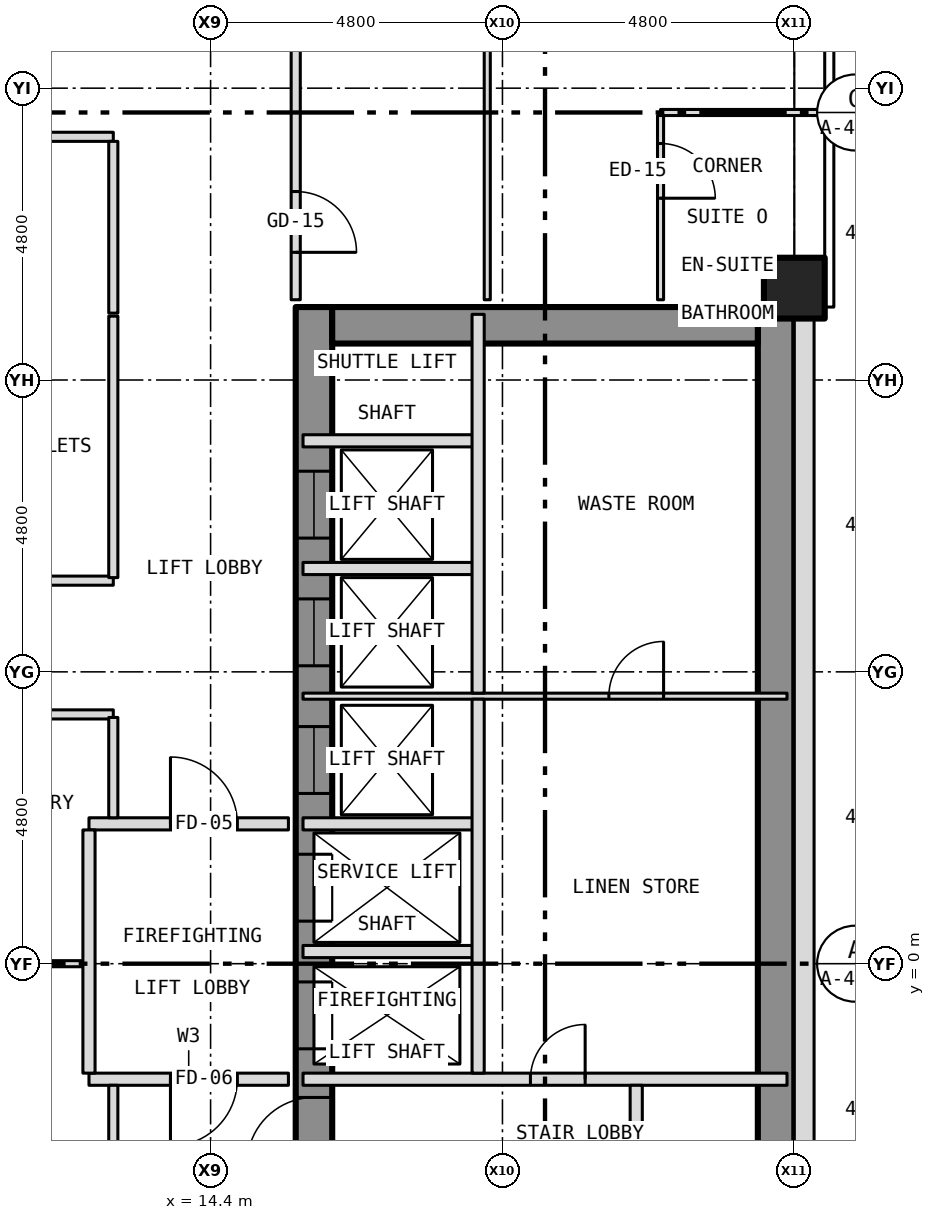
"""IFC4 building model, lengths in metres.
Left out: names, types, materials, properties, quantities, classifications, styles, units other than length and angle.
Written with IfcOpenShell. Run it as: python <this file> out.ifc"""

import sys

from ifc_helpers import new_model, si_unit, direction, frame, frame_2d, origin, origin_2d, place, context, subcontext, project, spatial, rectangle, hollow_rectangle, extrude, element, fill, save


model = new_model("IFC4")
c1 = context("Model", 3, precision=1e-05, world=origin(), true_north=direction((0.0, 1.0)))
c2 = subcontext(c1, "Body", "Model", "MODEL_VIEW")
j1 = project(units=[si_unit("LENGTHUNIT", "METRE"), si_unit("PLANEANGLEUNIT", "RADIAN")], contexts=[c1])
p1 = place(None, origin())
s1 = spatial("IfcSite", under=j1, at=p1, CompositionType="ELEMENT")
p2 = place(p1, origin())
s2 = spatial("IfcBuilding", under=s1, at=p2, CompositionType="ELEMENT")
p3 = place(p2, frame((0.0, 0.0, 53.0)))
s3 = spatial("IfcBuildingStorey", under=s2, at=p3, CompositionType="ELEMENT", Elevation=53.0)
p4 = place(p3, frame((24.0, 11.111, -0.15), z_axis=(0.0, 0.0, 1.0), x_axis=(1.0, 0.0, 0.0)))
e1 = element("IfcColumn", 1, at=p4, inside=s3, PredefinedType="COLUMN", context=c2, shape_type="SweptSolid", body=[
    extrude(hollow_rectangle(XDim=1.0, YDim=1.0, WallThickness=0.06, at=origin_2d()), origin(), (0.0, 0.0, 1.0), 3.5),
])
p5 = place(p3, frame((16.1, -10.8, 0.0), z_axis=(0.0, 0.0, 1.0), x_axis=(0.0, 1.0, 0.0)))
e2 = element("IfcWall", 2, at=p5, inside=s3, PredefinedType="SHEAR", context=c2, shape_type="SweptSolid", body=[
    extrude(rectangle(XDim=21.6, YDim=0.6, at=frame_2d((10.8, 0.0))), origin(), (0.0, 0.0, 1.0), 3.25),
])
p6 = place(p5, frame((9.4, 0.0, 0.0)))
e3 = element("IfcOpeningElement", 3, at=p6, cuts=e2, PredefinedType="OPENING", context=c2, shape_type="SweptSolid", body=[
    extrude(rectangle(XDim=1.1, YDim=2.1, at=frame_2d((0.55, 1.05))), frame((0.0, 0.312, 0.0), z_axis=(0.0, -1.0, 0.0), x_axis=(1.0, 0.0, 0.0)), (0.0, 0.0, 1.0), 0.624),
])
p7 = place(p5, frame((11.5, 0.0, 0.0)))
e4 = element("IfcOpeningElement", 4, at=p7, cuts=e2, PredefinedType="OPENING", context=c2, shape_type="SweptSolid", body=[
    extrude(rectangle(XDim=1.1, YDim=2.1, at=frame_2d((0.55, 1.05))), frame((0.0, 0.312, 0.0), z_axis=(0.0, -1.0, 0.0), x_axis=(1.0, 0.0, 0.0)), (0.0, 0.0, 1.0), 0.624),
])
p8 = place(p5, frame((13.6, 0.0, 0.0)))
e5 = element("IfcOpeningElement", 5, at=p8, cuts=e2, PredefinedType="OPENING", context=c2, shape_type="SweptSolid", body=[
    extrude(rectangle(XDim=1.1, YDim=2.1, at=frame_2d((0.55, 1.05))), frame((0.0, 0.312, 0.0), z_axis=(0.0, -1.0, 0.0), x_axis=(1.0, 0.0, 0.0)), (0.0, 0.0, 1.0), 0.624),
])
p9 = place(p5, frame((15.7, 0.0, 0.0)))
e6 = element("IfcOpeningElement", 6, at=p9, cuts=e2, PredefinedType="OPENING", context=c2, shape_type="SweptSolid", body=[
    extrude(rectangle(XDim=1.1, YDim=2.1, at=frame_2d((0.55, 1.05))), frame((0.0, 0.312, 0.0), z_axis=(0.0, -1.0, 0.0), x_axis=(1.0, 0.0, 0.0)), (0.0, 0.0, 1.0), 0.624),
])
p10 = place(p5, frame((17.8, 0.0, 0.0)))
e7 = element("IfcOpeningElement", 7, at=p10, cuts=e2, PredefinedType="OPENING", context=c2, shape_type="SweptSolid", body=[
    extrude(rectangle(XDim=1.1, YDim=2.1, at=frame_2d((0.55, 1.05))), frame((0.0, 0.312, 0.0), z_axis=(0.0, -1.0, 0.0), x_axis=(1.0, 0.0, 0.0)), (0.0, 0.0, 1.0), 0.624),
])
p11 = place(p5, frame((5.642, 0.0, 0.0)))
e8 = element("IfcOpeningElement", 8, at=p11, cuts=e2, PredefinedType="OPENING", context=c2, shape_type="SweptSolid", body=[
    extrude(rectangle(XDim=1.1, YDim=2.1, at=frame_2d((0.55, 1.05))), frame((0.0, 0.312, 0.0), z_axis=(0.0, -1.0, 0.0), x_axis=(1.0, 0.0, 0.0)), (0.0, 0.0, 1.0), 0.624),
])
p12 = place(p5, frame((7.5, 0.0, 0.0)))
e9 = element("IfcOpeningElement", 9, at=p12, cuts=e2, PredefinedType="OPENING", context=c2, shape_type="SweptSolid", body=[
    extrude(rectangle(XDim=1.1, YDim=2.1, at=frame_2d((0.55, 1.05))), frame((0.0, 0.312, 0.0), z_axis=(0.0, -1.0, 0.0), x_axis=(1.0, 0.0, 0.0)), (0.0, 0.0, 1.0), 0.624),
])
p13 = place(p3, frame((23.7, -10.8, 0.0), z_axis=(0.0, 0.0, 1.0), x_axis=(0.0, 1.0, 0.0)))
e10 = element("IfcWall", 10, at=p13, inside=s3, PredefinedType="SHEAR", context=c2, shape_type="SweptSolid", body=[
    extrude(rectangle(XDim=21.6, YDim=0.6, at=frame_2d((10.8, 0.0))), origin(), (0.0, 0.0, 1.0), 3.25),
])
p14 = place(p3, frame((16.4, 10.5, 0.0), z_axis=(0.0, 0.0, 1.0), x_axis=(1.0, 0.0, 0.0)))
e11 = element("IfcWall", 11, at=p14, inside=s3, PredefinedType="SHEAR", context=c2, shape_type="SweptSolid", body=[
    extrude(rectangle(XDim=7.0, YDim=0.6, at=frame_2d((3.5, 0.0))), origin(), (0.0, 0.0, 1.0), 3.25),
])
p15 = place(p3, frame((24.163, -10.8, 0.0), z_axis=(0.0, 0.0, 1.0), x_axis=(0.0, 1.0, 0.0)))
e12 = element("IfcWall", 12, at=p15, inside=s3, PredefinedType="SOLIDWALL", context=c2, shape_type="SweptSolid", body=[
    extrude(rectangle(XDim=21.6, YDim=0.325, at=frame_2d((10.8, 0.0))), origin(), (0.0, 0.0, 1.0), 3.5),
])
p16 = place(p15, frame((2.95, 0.0, 1.0)))
e13 = element("IfcOpeningElement", 13, at=p16, cuts=e12, PredefinedType="OPENING", context=c2, shape_type="SweptSolid", body=[
    extrude(rectangle(XDim=0.6, YDim=1.5, at=frame_2d((0.3, 0.75))), frame((0.0, 0.175, 0.0), z_axis=(0.0, -1.0, 0.0), x_axis=(1.0, 0.0, 0.0)), (0.0, 0.0, 1.0), 0.349),
])
p17 = place(p3, frame((12.4, -1.9, 0.0), z_axis=(0.0, 0.0, 1.0), x_axis=(1.0, 0.0, 0.0)))
e14 = element("IfcWall", 14, at=p17, inside=s3, PredefinedType="PARTITIONING", context=c2, shape_type="SweptSolid", body=[
    extrude(rectangle(XDim=3.28, YDim=0.2, at=frame_2d((1.64, 0.0))), origin(), (0.0, 0.0, 1.0), 3.35),
])
p18 = place(p17, frame((1.34, 0.0, 0.0)))
e15 = element("IfcOpeningElement", 15, at=p18, cuts=e14, PredefinedType="OPENING", context=c2, shape_type="SweptSolid", body=[
    extrude(rectangle(XDim=1.1, YDim=2.1, at=frame_2d((0.55, 1.05))), frame((0.0, 0.112, 0.0), z_axis=(0.0, -1.0, 0.0), x_axis=(1.0, 0.0, 0.0)), (0.0, 0.0, 1.0), 0.224),
])
p19 = place(p3, frame((15.92, -1.9, 0.0), z_axis=(0.0, 0.0, 1.0), x_axis=(1.0, 0.0, 0.0)))
e16 = element("IfcWall", 16, at=p19, inside=s3, PredefinedType="PARTITIONING", context=c2, shape_type="SweptSolid", body=[
    extrude(rectangle(XDim=7.96, YDim=0.2, at=frame_2d((3.98, 0.0))), origin(), (0.0, 0.0, 1.0), 3.25),
])
p20 = place(p19, frame((3.74, 0.0, 0.0)))
e17 = element("IfcOpeningElement", 17, at=p20, cuts=e16, PredefinedType="OPENING", context=c2, shape_type="SweptSolid", body=[
    extrude(rectangle(XDim=0.9, YDim=2.1, at=frame_2d((0.45, 1.05))), frame((0.0, 0.112, 0.0), z_axis=(0.0, -1.0, 0.0), x_axis=(1.0, 0.0, 0.0)), (0.0, 0.0, 1.0), 0.224),
])
p21 = place(p3, frame((9.804, 0.0, 0.0), z_axis=(0.0, 0.0, 1.0), x_axis=(1.0, 0.0, 0.0)))
e18 = element("IfcWall", 18, at=p21, inside=s3, PredefinedType="PARTITIONING", context=c2, shape_type="SweptSolid", body=[
    extrude(rectangle(XDim=2.596, YDim=0.1, at=frame_2d((1.298, 0.0))), origin(), (0.0, 0.0, 1.0), 2.728),
])
p22 = place(p3, frame((15.92, 0.2, 0.0), z_axis=(0.0, 0.0, 1.0), x_axis=(1.0, 0.0, 0.0)))
e19 = element("IfcWall", 19, at=p22, inside=s3, PredefinedType="PARTITIONING", context=c2, shape_type="SweptSolid", body=[
    extrude(rectangle(XDim=2.88, YDim=0.2, at=frame_2d((1.44, 0.0))), origin(), (0.0, 0.0, 1.0), 3.25),
])
p23 = place(p3, frame((12.4, 2.3, 0.0), z_axis=(0.0, 0.0, 1.0), x_axis=(1.0, 0.0, 0.0)))
e20 = element("IfcWall", 20, at=p23, inside=s3, PredefinedType="PARTITIONING", context=c2, shape_type="SweptSolid", body=[
    extrude(rectangle(XDim=3.28, YDim=0.2, at=frame_2d((1.64, 0.0))), origin(), (0.0, 0.0, 1.0), 3.35),
])
p24 = place(p23, frame((1.34, 0.0, 0.0)))
e21 = element("IfcOpeningElement", 21, at=p24, cuts=e20, PredefinedType="OPENING", context=c2, shape_type="SweptSolid", body=[
    extrude(rectangle(XDim=1.1, YDim=2.1, at=frame_2d((0.55, 1.05))), frame((0.0, 0.112, 0.0), z_axis=(0.0, -1.0, 0.0), x_axis=(1.0, 0.0, 0.0)), (0.0, 0.0, 1.0), 0.224),
])
p25 = place(p3, frame((15.92, 2.3, 0.0), z_axis=(0.0, 0.0, 1.0), x_axis=(1.0, 0.0, 0.0)))
e22 = element("IfcWall", 22, at=p25, inside=s3, PredefinedType="PARTITIONING", context=c2, shape_type="SweptSolid", body=[
    extrude(rectangle(XDim=2.88, YDim=0.2, at=frame_2d((1.44, 0.0))), origin(), (0.0, 0.0, 1.0), 3.25),
])
p26 = place(p3, frame((6.3, 4.1, 0.0), z_axis=(0.0, 0.0, 1.0), x_axis=(1.0, 0.0, 0.0)))
e23 = element("IfcWall", 23, at=p26, inside=s3, PredefinedType="PARTITIONING", context=c2, shape_type="SweptSolid", body=[
    extrude(rectangle(XDim=6.5, YDim=0.15, at=frame_2d((3.25, 0.0))), origin(), (0.0, 0.0, 1.0), 3.35),
])
p27 = place(p26, frame((4.45, 0.0, 0.0)))
e24 = element("IfcOpeningElement", 24, at=p27, cuts=e23, PredefinedType="OPENING", context=c2, shape_type="SweptSolid", body=[
    extrude(rectangle(XDim=0.9, YDim=2.1, at=frame_2d((0.45, 1.05))), frame((0.0, 0.087, 0.0), z_axis=(0.0, -1.0, 0.0), x_axis=(1.0, 0.0, 0.0)), (0.0, 0.0, 1.0), 0.174),
])
p28 = place(p3, frame((15.92, 4.4, 0.0), z_axis=(0.0, 0.0, 1.0), x_axis=(1.0, 0.0, 0.0)))
e25 = element("IfcWall", 25, at=p28, inside=s3, PredefinedType="PARTITIONING", context=c2, shape_type="SweptSolid", body=[
    extrude(rectangle(XDim=7.96, YDim=0.1, at=frame_2d((3.98, 0.0))), origin(), (0.0, 0.0, 1.0), 3.25),
])
p29 = place(p28, frame((5.03, 0.0, 0.0)))
e26 = element("IfcOpeningElement", 26, at=p29, cuts=e25, PredefinedType="OPENING", context=c2, shape_type="SweptSolid", body=[
    extrude(rectangle(XDim=0.9, YDim=2.1, at=frame_2d((0.45, 1.05))), frame((0.0, 0.062, 0.0), z_axis=(0.0, -1.0, 0.0), x_axis=(1.0, 0.0, 0.0)), (0.0, 0.0, 1.0), 0.124),
])
p30 = place(p3, frame((6.3, 6.3, 0.0), z_axis=(0.0, 0.0, 1.0), x_axis=(1.0, 0.0, 0.0)))
e27 = element("IfcWall", 27, at=p30, inside=s3, PredefinedType="PARTITIONING", context=c2, shape_type="SweptSolid", body=[
    extrude(rectangle(XDim=6.5, YDim=0.15, at=frame_2d((3.25, 0.0))), origin(), (0.0, 0.0, 1.0), 3.35),
])
p31 = place(p30, frame((4.45, 0.0, 0.0)))
e28 = element("IfcOpeningElement", 28, at=p31, cuts=e27, PredefinedType="OPENING", context=c2, shape_type="SweptSolid", body=[
    extrude(rectangle(XDim=0.9, YDim=2.1, at=frame_2d((0.45, 1.05))), frame((0.0, 0.087, 0.0), z_axis=(0.0, -1.0, 0.0), x_axis=(1.0, 0.0, 0.0)), (0.0, 0.0, 1.0), 0.174),
])
for number, where, z_axis, x_axis in (
    (29, (15.92, 6.5, 0.0), (0.0, 0.0, 1.0), (1.0, 0.0, 0.0)),
    (30, (15.92, 8.6, 0.0), (0.0, 0.0, 1.0), (1.0, 0.0, 0.0)),
):
    element("IfcWall", number, at=place(p3, frame(where, z_axis=z_axis, x_axis=x_axis)), inside=s3, PredefinedType="PARTITIONING", context=c2, shape_type="SweptSolid", body=[
        extrude(rectangle(XDim=2.88, YDim=0.2, at=frame_2d((1.44, 0.0))), origin(), (0.0, 0.0, 1.0), 3.25),
    ])
p32 = place(p3, frame((6.3, 13.6, 0.0), z_axis=(0.0, 0.0, 1.0), x_axis=(1.0, 0.0, 0.0)))
e31 = element("IfcWall", 31, at=p32, inside=s3, PredefinedType="PARTITIONING", context=c2, shape_type="SweptSolid", body=[
    extrude(rectangle(XDim=6.5, YDim=0.15, at=frame_2d((3.25, 0.0))), origin(), (0.0, 0.0, 1.0), 3.35),
])
p33 = place(p3, frame((21.8, 14.0, 0.0), z_axis=(0.0, 0.0, 1.0), x_axis=(1.0, 0.0, 0.0)))
e32 = element("IfcWall", 32, at=p33, inside=s3, PredefinedType="PARTITIONING", context=c2, shape_type="SweptSolid", body=[
    extrude(rectangle(XDim=2.73, YDim=0.1, at=frame_2d((1.365, 0.0))), origin(), (0.0, 0.0, 1.0), 3.35),
])
p34 = place(p3, frame((12.4, -1.8, 0.0), z_axis=(0.0, 0.0, 1.0), x_axis=(0.0, 1.0, 0.0)))
e33 = element("IfcWall", 33, at=p34, inside=s3, PredefinedType="PARTITIONING", context=c2, shape_type="SweptSolid", body=[
    extrude(rectangle(XDim=4.0, YDim=0.2, at=frame_2d((2.0, 0.0))), origin(), (0.0, 0.0, 1.0), 3.35),
])
p35 = place(p3, frame((12.8, -13.525, 0.0), z_axis=(0.0, 0.0, 1.0), x_axis=(0.0, 1.0, 0.0)))
e34 = element("IfcWall", 34, at=p35, inside=s3, PredefinedType="PARTITIONING", context=c2, shape_type="SweptSolid", body=[
    extrude(rectangle(XDim=11.525, YDim=0.15, at=frame_2d((5.762, 0.0))), origin(), (0.0, 0.0, 1.0), 3.35),
])
p36 = place(p35, frame((7.325, 0.0, 0.0)))
e35 = element("IfcOpeningElement", 35, at=p36, cuts=e34, PredefinedType="OPENING", context=c2, shape_type="SweptSolid", body=[
    extrude(rectangle(XDim=0.9, YDim=2.1, at=frame_2d((0.45, 1.05))), frame((0.0, 0.087, 0.0), z_axis=(0.0, -1.0, 0.0), x_axis=(1.0, 0.0, 0.0)), (0.0, 0.0, 1.0), 0.174),
])
p37 = place(p3, frame((12.8, 2.4, 0.0), z_axis=(0.0, 0.0, 1.0), x_axis=(0.0, 1.0, 0.0)))
e36 = element("IfcWall", 36, at=p37, inside=s3, PredefinedType="PARTITIONING", context=c2, shape_type="SweptSolid", body=[
    extrude(rectangle(XDim=1.65, YDim=0.15, at=frame_2d((0.825, 0.0))), origin(), (0.0, 0.0, 1.0), 3.35),
])
p38 = place(p3, frame((12.8, 6.35, 0.0), z_axis=(0.0, 0.0, 1.0), x_axis=(0.0, 1.0, 0.0)))
e37 = element("IfcWall", 37, at=p38, inside=s3, PredefinedType="PARTITIONING", context=c2, shape_type="SweptSolid", body=[
    extrude(rectangle(XDim=4.3, YDim=0.15, at=frame_2d((2.15, 0.0))), origin(), (0.0, 0.0, 1.0), 3.35),
])
p39 = place(p3, frame((12.8, 10.7, 0.0), z_axis=(0.0, 0.0, 1.0), x_axis=(0.0, 1.0, 0.0)))
e38 = element("IfcWall", 38, at=p39, inside=s3, PredefinedType="PARTITIONING", context=c2, shape_type="SweptSolid", body=[
    extrude(rectangle(XDim=2.825, YDim=0.15, at=frame_2d((1.413, 0.0))), origin(), (0.0, 0.0, 1.0), 3.35),
])
p40 = place(p3, frame((15.8, 10.92, 0.0), z_axis=(0.0, 0.0, 1.0), x_axis=(0.0, 1.0, 0.0)))
e39 = element("IfcWall", 39, at=p40, inside=s3, PredefinedType="PARTITIONING", context=c2, shape_type="SweptSolid", body=[
    extrude(rectangle(XDim=4.805, YDim=0.15, at=frame_2d((2.403, 0.0))), origin(), (0.0, 0.0, 1.0), 3.35),
])
p41 = place(p40, frame((0.78, 0.0, 0.0)))
e40 = element("IfcOpeningElement", 40, at=p41, cuts=e39, PredefinedType="OPENING", context=c2, shape_type="SweptSolid", body=[
    extrude(rectangle(XDim=1.0, YDim=2.1, at=frame_2d((0.5, 1.05))), frame((0.0, 0.087, 0.0), z_axis=(0.0, -1.0, 0.0), x_axis=(1.0, 0.0, 0.0)), (0.0, 0.0, 1.0), 0.174),
])
p42 = place(p3, frame((18.8, -1.8, 0.0), z_axis=(0.0, 0.0, 1.0), x_axis=(0.0, 1.0, 0.0)))
e41 = element("IfcWall", 41, at=p42, inside=s3, PredefinedType="PARTITIONING", context=c2, shape_type="SweptSolid", body=[
    extrude(rectangle(XDim=6.15, YDim=0.2, at=frame_2d((3.075, 0.0))), origin(), (0.0, 0.0, 1.0), 3.25),
])
p43 = place(p3, frame((18.8, 4.45, 0.0), z_axis=(0.0, 0.0, 1.0), x_axis=(0.0, 1.0, 0.0)))
e42 = element("IfcWall", 42, at=p43, inside=s3, PredefinedType="PARTITIONING", context=c2, shape_type="SweptSolid", body=[
    extrude(rectangle(XDim=6.23, YDim=0.2, at=frame_2d((3.115, 0.0))), origin(), (0.0, 0.0, 1.0), 3.25),
])
p44 = place(p3, frame((18.95, 10.92, 0.0), z_axis=(0.0, 0.0, 1.0), x_axis=(0.0, 1.0, 0.0)))
e43 = element("IfcWall", 43, at=p44, inside=s3, PredefinedType="PARTITIONING", context=c2, shape_type="SweptSolid", body=[
    extrude(rectangle(XDim=13.61, YDim=0.1, at=frame_2d((6.805, 0.0))), origin(), (0.0, 0.0, 1.0), 3.35),
])
p45 = place(p44, frame((6.03, 0.0, 0.0)))
e44 = element("IfcOpeningElement", 44, at=p45, cuts=e43, PredefinedType="OPENING", context=c2, shape_type="SweptSolid", body=[
    extrude(rectangle(XDim=0.9, YDim=2.1, at=frame_2d((0.45, 1.05))), frame((0.0, 0.062, 0.0), z_axis=(0.0, -1.0, 0.0), x_axis=(1.0, 0.0, 0.0)), (0.0, 0.0, 1.0), 0.124),
])
p46 = place(p3, frame((21.4, -10.68, 0.0), z_axis=(0.0, 0.0, 1.0), x_axis=(0.0, 1.0, 0.0)))
e45 = element("IfcWall", 45, at=p46, inside=s3, PredefinedType="PARTITIONING", context=c2, shape_type="SweptSolid", body=[
    extrude(rectangle(XDim=8.68, YDim=0.2, at=frame_2d((4.34, 0.0))), origin(), (0.0, 0.0, 1.0), 3.25),
])
p47 = place(p46, frame((3.88, 0.0, 0.0)))
e46 = element("IfcOpeningElement", 46, at=p47, cuts=e45, PredefinedType="OPENING", context=c2, shape_type="SweptSolid", body=[
    extrude(rectangle(XDim=0.9, YDim=2.1, at=frame_2d((0.45, 1.05))), frame((0.0, 0.112, 0.0), z_axis=(0.0, -1.0, 0.0), x_axis=(1.0, 0.0, 0.0)), (0.0, 0.0, 1.0), 0.224),
])
p48 = place(p3, frame((21.8, 10.92, 0.0), z_axis=(0.0, 0.0, 1.0), x_axis=(0.0, 1.0, 0.0)))
e47 = element("IfcWall", 47, at=p48, inside=s3, PredefinedType="PARTITIONING", context=c2, shape_type="SweptSolid", body=[
    extrude(rectangle(XDim=3.03, YDim=0.1, at=frame_2d((1.515, 0.0))), origin(), (0.0, 0.0, 1.0), 3.35),
])
p49 = place(p48, frame((1.67, 0.0, 0.0)))
e48 = element("IfcOpeningElement", 48, at=p49, cuts=e47, PredefinedType="OPENING", context=c2, shape_type="SweptSolid", body=[
    extrude(rectangle(XDim=0.9, YDim=2.1, at=frame_2d((0.45, 1.05))), frame((0.0, 0.062, 0.0), z_axis=(0.0, -1.0, 0.0), x_axis=(1.0, 0.0, 0.0)), (0.0, 0.0, 1.0), 0.124),
])
p50 = place(p6, origin())
e49 = element("IfcDoor", 49, at=p50, inside=s3, OperationType="SLIDING_TO_LEFT", PredefinedType="DOOR", context=c2, shape_type="SweptSolid", body=[
    extrude(rectangle(XDim=1.1, YDim=2.1, at=frame_2d((0.55, 1.05))), frame((0.0, 0.025, 0.0), z_axis=(0.0, -1.0, 0.0), x_axis=(1.0, 0.0, 0.0)), (0.0, 0.0, 1.0), 0.05),
])
fill(e3, e49)
p51 = place(p7, origin())
e50 = element("IfcDoor", 50, at=p51, inside=s3, OperationType="SLIDING_TO_LEFT", PredefinedType="DOOR", context=c2, shape_type="SweptSolid", body=[
    extrude(rectangle(XDim=1.1, YDim=2.1, at=frame_2d((0.55, 1.05))), frame((0.0, 0.025, 0.0), z_axis=(0.0, -1.0, 0.0), x_axis=(1.0, 0.0, 0.0)), (0.0, 0.0, 1.0), 0.05),
])
fill(e4, e50)
p52 = place(p8, origin())
e51 = element("IfcDoor", 51, at=p52, inside=s3, OperationType="SLIDING_TO_LEFT", PredefinedType="DOOR", context=c2, shape_type="SweptSolid", body=[
    extrude(rectangle(XDim=1.1, YDim=2.1, at=frame_2d((0.55, 1.05))), frame((0.0, 0.025, 0.0), z_axis=(0.0, -1.0, 0.0), x_axis=(1.0, 0.0, 0.0)), (0.0, 0.0, 1.0), 0.05),
])
fill(e5, e51)
p53 = place(p9, origin())
e52 = element("IfcDoor", 52, at=p53, inside=s3, OperationType="SLIDING_TO_LEFT", PredefinedType="DOOR", context=c2, shape_type="SweptSolid", body=[
    extrude(rectangle(XDim=1.1, YDim=2.1, at=frame_2d((0.55, 1.05))), frame((0.0, 0.025, 0.0), z_axis=(0.0, -1.0, 0.0), x_axis=(1.0, 0.0, 0.0)), (0.0, 0.0, 1.0), 0.05),
])
fill(e6, e52)
p54 = place(p10, origin())
e53 = element("IfcDoor", 53, at=p54, inside=s3, OperationType="SLIDING_TO_LEFT", PredefinedType="DOOR", context=c2, shape_type="SweptSolid", body=[
    extrude(rectangle(XDim=1.1, YDim=2.1, at=frame_2d((0.55, 1.05))), frame((0.0, 0.025, 0.0), z_axis=(0.0, -1.0, 0.0), x_axis=(1.0, 0.0, 0.0)), (0.0, 0.0, 1.0), 0.05),
])
fill(e7, e53)
p55 = place(p12, origin())
e54 = element("IfcDoor", 54, at=p55, inside=s3, OperationType="SINGLE_SWING_LEFT", PredefinedType="DOOR", context=c2, shape_type="SweptSolid", body=[
    extrude(rectangle(XDim=1.1, YDim=2.1, at=frame_2d((0.55, 1.05))), frame((0.0, 0.025, 0.0), z_axis=(0.0, -1.0, 0.0), x_axis=(1.0, 0.0, 0.0)), (0.0, 0.0, 1.0), 0.05),
])
fill(e9, e54)
p56 = place(p20, origin())
e55 = element("IfcDoor", 55, at=p56, inside=s3, OperationType="SINGLE_SWING_RIGHT", PredefinedType="DOOR", context=c2, shape_type="SweptSolid", body=[
    extrude(rectangle(XDim=0.9, YDim=2.1, at=frame_2d((0.45, 1.05))), frame((0.0, 0.025, 0.0), z_axis=(0.0, -1.0, 0.0), x_axis=(1.0, 0.0, 0.0)), (0.0, 0.0, 1.0), 0.05),
])
fill(e17, e55)
p57 = place(p29, origin())
e56 = element("IfcDoor", 56, at=p57, inside=s3, OperationType="SINGLE_SWING_RIGHT", PredefinedType="DOOR", context=c2, shape_type="SweptSolid", body=[
    extrude(rectangle(XDim=0.9, YDim=2.1, at=frame_2d((0.45, 1.05))), frame((0.0, 0.025, 0.0), z_axis=(0.0, -1.0, 0.0), x_axis=(1.0, 0.0, 0.0)), (0.0, 0.0, 1.0), 0.05),
])
fill(e26, e56)
p58 = place(p24, origin())
e57 = element("IfcDoor", 57, at=p58, inside=s3, OperationType="SINGLE_SWING_LEFT", PredefinedType="DOOR", context=c2, shape_type="SweptSolid", body=[
    extrude(rectangle(XDim=1.1, YDim=2.1, at=frame_2d((0.55, 1.05))), frame((0.0, 0.025, 0.0), z_axis=(0.0, -1.0, 0.0), x_axis=(1.0, 0.0, 0.0)), (0.0, 0.0, 1.0), 0.05),
])
fill(e21, e57)
p59 = place(p18, origin())
e58 = element("IfcDoor", 58, at=p59, inside=s3, OperationType="SINGLE_SWING_LEFT", PredefinedType="DOOR", context=c2, shape_type="SweptSolid", body=[
    extrude(rectangle(XDim=1.1, YDim=2.1, at=frame_2d((0.55, 1.05))), frame((0.0, 0.025, 0.0), z_axis=(0.0, -1.0, 0.0), x_axis=(1.0, 0.0, 0.0)), (0.0, 0.0, 1.0), 0.05),
])
fill(e15, e58)
p60 = place(p41, origin())
e59 = element("IfcDoor", 59, at=p60, inside=s3, OperationType="SINGLE_SWING_LEFT", PredefinedType="DOOR", context=c2, shape_type="SweptSolid", body=[
    extrude(rectangle(XDim=1.0, YDim=2.1, at=frame_2d((0.5, 1.05))), frame((0.0, 0.025, 0.0), z_axis=(0.0, -1.0, 0.0), x_axis=(1.0, 0.0, 0.0)), (0.0, 0.0, 1.0), 0.05),
])
fill(e40, e59)
p61 = place(p49, origin())
e60 = element("IfcDoor", 60, at=p61, inside=s3, OperationType="SINGLE_SWING_LEFT", PredefinedType="DOOR", context=c2, shape_type="SweptSolid", body=[
    extrude(rectangle(XDim=0.9, YDim=2.1, at=frame_2d((0.45, 1.05))), frame((0.0, 0.025, 0.0), z_axis=(0.0, -1.0, 0.0), x_axis=(1.0, 0.0, 0.0)), (0.0, 0.0, 1.0), 0.05),
])
fill(e48, e60)
save(model, sys.argv[1])
